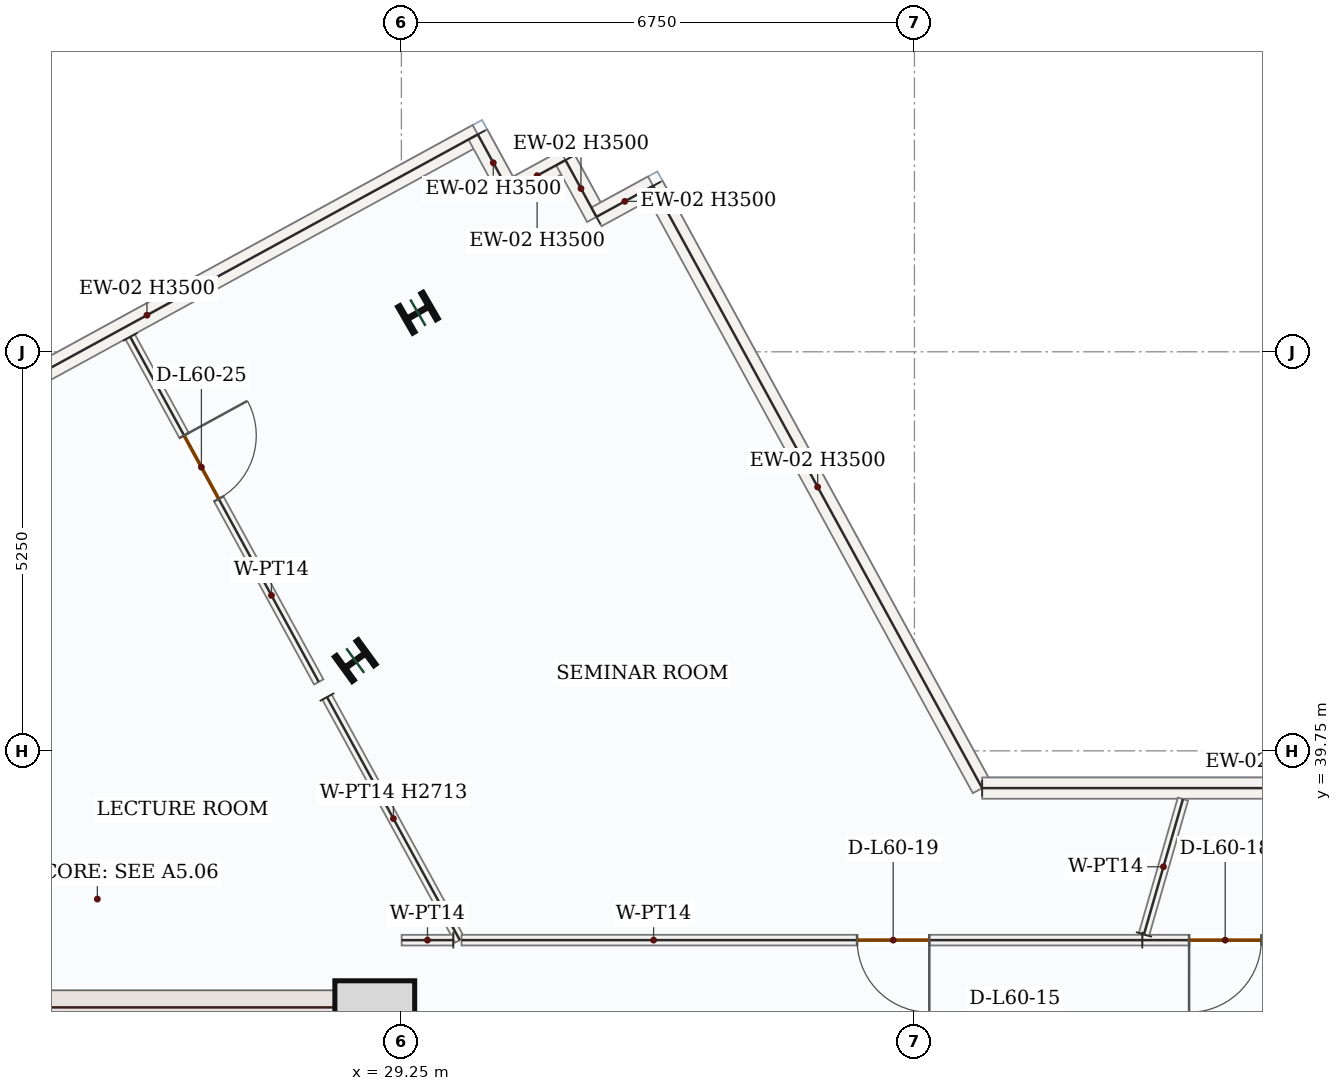
"""IFC4 building model, lengths in metres.
Left out: names, types, materials, properties, quantities, classifications, styles, units other than length and angle.
Written with IfcOpenShell. Run it as: python <this file> out.ifc"""

import sys

from ifc_helpers import new_model, si_unit, direction, frame, frame_2d, origin, origin_2d, place, context, subcontext, project, spatial, rectangle, i_section, extrude, source, transform, mapped, element, fill, save


model = new_model("IFC4")
c1 = context("Model", 3, precision=1e-05, world=origin(), true_north=direction((0.0, 1.0)))
c2 = subcontext(c1, "Body", "Model", "MODEL_VIEW")
j1 = project(units=[si_unit("LENGTHUNIT", "METRE"), si_unit("PLANEANGLEUNIT", "RADIAN")], contexts=[c1])
p1 = place(None, origin())
s1 = spatial("IfcSite", under=j1, at=p1, CompositionType="ELEMENT")
p2 = place(p1, origin())
s2 = spatial("IfcBuilding", under=s1, at=p2, CompositionType="ELEMENT")
p3 = place(p2, frame((0.0, 0.0, 254.1)))
s3 = spatial("IfcBuildingStorey", under=s2, at=p3, CompositionType="ELEMENT", Elevation=254.1)
p4 = place(p3, frame((29.025, 28.05, 0.0), z_axis=(0.0, 0.0, 1.0), x_axis=(0.0, 1.0, 0.0)))
e1 = element("IfcWall", 1, at=p4, inside=s3, PredefinedType="SHEAR", context=c2, shape_type="SweptSolid", body=[
    extrude(rectangle(XDim=8.55, YDim=0.45, at=frame_2d((4.275, 0.0))), origin(), (0.0, 0.0, 1.0), 3.5),
])
p5 = place(p4, frame((1.5, 0.0, 0.0)))
e2 = element("IfcOpeningElement", 2, at=p5, cuts=e1, PredefinedType="OPENING", context=c2, shape_type="SweptSolid", body=[
    extrude(rectangle(XDim=1.1, YDim=2.2, at=frame_2d((0.55, 1.1))), frame((0.0, 0.235, 0.0), z_axis=(0.0, -1.0, 0.0), x_axis=(1.0, 0.0, 0.0)), (0.0, 0.0, 1.0), 0.47),
])
m1 = source(origin(), c2, "Body", "SweptSolid", [
    extrude(rectangle(XDim=7.1, YDim=0.45, at=frame_2d((3.55, 0.0))), origin(), (0.0, 0.0, 1.0), 3.5),
])
p6 = place(p3, frame((21.7, 36.375, 0.0), z_axis=(0.0, 0.0, 1.0), x_axis=(1.0, 0.0, 0.0)))
e3 = element("IfcWall", 3, at=p6, inside=s3, PredefinedType="SHEAR", context=c2, shape_type="MappedRepresentation", body=[
    mapped(m1, transform((0.0, 0.0, 0.0), x_axis=(1.0, 0.0, 0.0), y_axis=(0.0, 1.0, 0.0), z_axis=(0.0, 0.0, 1.0), scale=1.0)),
])
m2 = source(origin(), c2, "Body", "SweptSolid", [
    extrude(rectangle(XDim=1.05, YDim=1.05, at=origin_2d()), origin(), (0.0, 0.0, 1.0), 3.75),
])
p7 = place(p3, frame((28.9, 36.2, 0.0), z_axis=(0.0, 0.0, 1.0), x_axis=(1.0, 0.0, 0.0)))
e4 = element("IfcColumn", 4, at=p7, inside=s3, PredefinedType="COLUMN", context=c2, shape_type="MappedRepresentation", body=[
    mapped(m2, transform((0.0, 0.0, 0.0), x_axis=(1.0, 0.0, 0.0), y_axis=(0.0, 1.0, 0.0), z_axis=(0.0, 0.0, 1.0), scale=1.0)),
])
m3 = source(origin(), c2, "Body", "SweptSolid", [
    extrude(i_section(OverallWidth=0.399, OverallDepth=0.386, WebThickness=0.021, FlangeThickness=0.033, FilletRadius=0.018, at=origin_2d()), origin(), (0.0, 0.0, 1.0), 3.75),
])
for number, where, z_axis, x_axis in (
    (5, (28.643, 40.937, 0.0), (0.0, 0.0, 1.0), (-0.588, 0.809, 0.0)),
    (6, (29.468, 45.514, 0.0), (0.0, 0.0, 1.0), (-0.5, 0.866, 0.0)),
):
    element("IfcColumn", number, at=place(p3, frame(where, z_axis=z_axis, x_axis=x_axis)), inside=s3, PredefinedType="COLUMN", context=c2, shape_type="MappedRepresentation", body=[
        mapped(m3, transform((0.0, 0.0, 0.0), x_axis=(1.0, 0.0, 0.0), y_axis=(0.0, 1.0, 0.0), z_axis=(0.0, 0.0, 1.0), scale=1.0)),
    ])
m4 = source(origin(), c2, "Body", "SweptSolid", [
    extrude(rectangle(XDim=9.92, YDim=0.28, at=frame_2d((4.96, 0.0))), origin(), (0.0, 0.0, 1.0), 3.5),
])
p8 = place(p3, frame((21.55, 43.104, 0.0), z_axis=(0.0, 0.0, 1.0), x_axis=(0.877572768104, 0.479443465574, 0.0)))
e7 = element("IfcWall", 7, at=p8, inside=s3, PredefinedType="SOLIDWALL", context=c2, shape_type="MappedRepresentation", body=[
    mapped(m4, transform((0.0, 0.0, 0.0), x_axis=(1.0, 0.0, 0.0), y_axis=(0.0, 1.0, 0.0), z_axis=(0.0, 0.0, 1.0), scale=1.0)),
])
m5 = source(origin(), c2, "Body", "SweptSolid", [
    extrude(rectangle(XDim=0.85, YDim=0.28, at=frame_2d((0.425, 0.0))), origin(), (0.0, 0.0, 1.0), 3.5),
])
for number, where, z_axis, x_axis in (
    (8, (30.255, 47.86, 0.0), (0.0, 0.0, 1.0), (0.479, -0.878, 0.0)),
    (9, (30.663, 47.114, 0.0), (0.0, 0.0, 1.0), (0.878, 0.479, 0.0)),
):
    element("IfcWall", number, at=place(p3, frame(where, z_axis=z_axis, x_axis=x_axis)), inside=s3, PredefinedType="SOLIDWALL", context=c2, shape_type="MappedRepresentation", body=[
        mapped(m5, transform((0.0, 0.0, 0.0), x_axis=(1.0, 0.0, 0.0), y_axis=(0.0, 1.0, 0.0), z_axis=(0.0, 0.0, 1.0), scale=1.0)),
    ])
m6 = source(origin(), c2, "Body", "SweptSolid", [
    extrude(rectangle(XDim=0.85, YDim=0.28, at=frame_2d((0.425, 0.0))), origin(), (0.0, 0.0, 1.0), 3.5),
])
p9 = place(p3, frame((31.409, 47.521, 0.0), z_axis=(0.0, 0.0, 1.0), x_axis=(0.479656876283, -0.877456141943, 0.0)))
e10 = element("IfcWall", 10, at=p9, inside=s3, PredefinedType="SOLIDWALL", context=c2, shape_type="MappedRepresentation", body=[
    mapped(m6, transform((0.0, 0.0, 0.0), x_axis=(1.0, 0.0, 0.0), y_axis=(0.0, 1.0, 0.0), z_axis=(0.0, 0.0, 1.0), scale=1.0)),
])
p10 = place(p3, frame((31.816, 46.775, 0.0), z_axis=(0.0, 0.0, 1.0), x_axis=(0.877577015132, 0.479435691737, 0.0)))
e11 = element("IfcWall", 11, at=p10, inside=s3, PredefinedType="SOLIDWALL", context=c2, shape_type="MappedRepresentation", body=[
    mapped(m5, transform((0.0, 0.0, 0.0), x_axis=(1.0, 0.0, 0.0), y_axis=(0.0, 1.0, 0.0), z_axis=(0.0, 0.0, 1.0), scale=1.0)),
])
m7 = source(origin(), c2, "Body", "SweptSolid", [
    extrude(rectangle(XDim=9.028, YDim=0.28, at=frame_2d((4.514, 0.0))), origin(), (0.0, 0.0, 1.0), 3.5),
])
p11 = place(p3, frame((32.562, 47.183, 0.0), z_axis=(0.0, 0.0, 1.0), x_axis=(0.479475345647, -0.877555350344, 0.0)))
e12 = element("IfcWall", 12, at=p11, inside=s3, PredefinedType="SOLIDWALL", context=c2, shape_type="MappedRepresentation", body=[
    mapped(m7, transform((0.0, 0.0, 0.0), x_axis=(1.0, 0.0, 0.0), y_axis=(0.0, 1.0, 0.0), z_axis=(0.0, 0.0, 1.0), scale=1.0)),
])
m8 = source(origin(), c2, "Body", "SweptSolid", [
    extrude(rectangle(XDim=7.658, YDim=0.28, at=frame_2d((3.829, 0.0))), origin(), (0.0, 0.0, 1.0), 2.772),
])
p12 = place(p3, frame((36.891, 39.26, 0.0), z_axis=(0.0, 0.0, 1.0), x_axis=(1.0, 0.0, 0.0)))
e13 = element("IfcWall", 13, at=p12, inside=s3, PredefinedType="SOLIDWALL", context=c2, shape_type="MappedRepresentation", body=[
    mapped(m8, transform((0.0, 0.0, 0.0), x_axis=(1.0, 0.0, 0.0), y_axis=(0.0, 1.0, 0.0), z_axis=(0.0, 0.0, 1.0), scale=1.0)),
])
p13 = place(p3, frame((42.747, 37.259, 0.0), z_axis=(0.0, 0.0, 1.0), x_axis=(-0.99999994699, 0.000325605609, 0.0)))
e14 = element("IfcWall", 14, at=p13, inside=s3, PredefinedType="PARTITIONING", context=c2, shape_type="SweptSolid", body=[
    extrude(rectangle(XDim=3.749, YDim=0.14, at=frame_2d((1.875, 0.0))), origin(), (0.0, 0.0, 1.0), 3.5),
])
p14 = place(p13, frame((2.183, 0.0, 0.0)))
e15 = element("IfcOpeningElement", 15, at=p14, cuts=e14, PredefinedType="OPENING", context=c2, shape_type="SweptSolid", body=[
    extrude(rectangle(XDim=0.95, YDim=2.15, at=frame_2d((0.475, 1.075))), frame((0.0, 0.08, 0.0), z_axis=(0.0, -1.0, 0.0), x_axis=(1.0, 0.0, 0.0)), (0.0, 0.0, 1.0), 0.16),
])
m9 = source(origin(), c2, "Body", "SweptSolid", [
    extrude(rectangle(XDim=1.853, YDim=0.14, at=frame_2d((0.926, 0.0))), origin(), (0.0, 0.0, 1.0), 3.5),
])
p15 = place(p3, frame((39.019, 37.335, 0.0), z_axis=(0.0, 0.0, 1.0), x_axis=(0.276896245691, 0.960899822626, 0.0)))
e16 = element("IfcWall", 16, at=p15, inside=s3, PredefinedType="PARTITIONING", context=c2, shape_type="MappedRepresentation", body=[
    mapped(m9, transform((0.0, 0.0, 0.0), x_axis=(1.0, 0.0, 0.0), y_axis=(0.0, 1.0, 0.0), z_axis=(0.0, 0.0, 1.0), scale=1.0)),
])
p16 = place(p3, frame((25.683, 45.196, 0.0), z_axis=(0.0, 0.0, 1.0), x_axis=(0.479427410708, -0.877581539153, 0.0)))
e17 = element("IfcWall", 17, at=p16, inside=s3, PredefinedType="PARTITIONING", context=c2, shape_type="SweptSolid", body=[
    extrude(rectangle(XDim=5.173, YDim=0.14, at=frame_2d((2.586, 0.0))), origin(), (0.0, 0.0, 1.0), 3.5),
])
p17 = place(p16, frame((1.478, 0.0, 0.0)))
e18 = element("IfcOpeningElement", 18, at=p17, cuts=e17, PredefinedType="OPENING", context=c2, shape_type="SweptSolid", body=[
    extrude(rectangle(XDim=0.95, YDim=2.15, at=frame_2d((0.475, 1.075))), frame((0.0, 0.08, 0.0), z_axis=(0.0, -1.0, 0.0), x_axis=(1.0, 0.0, 0.0)), (0.0, 0.0, 1.0), 0.16),
])
m10 = source(origin(), c2, "Body", "SweptSolid", [
    extrude(rectangle(XDim=3.644, YDim=0.14, at=frame_2d((1.822, 0.0))), origin(), (0.0, 0.0, 1.0), 2.713),
])
p18 = place(p3, frame((28.271, 40.457, 0.0), z_axis=(0.0, 0.0, 1.0), x_axis=(0.479509272429, -0.877536812706, 0.0)))
e19 = element("IfcWall", 19, at=p18, inside=s3, PredefinedType="PARTITIONING", context=c2, shape_type="MappedRepresentation", body=[
    mapped(m10, transform((0.0, 0.0, 0.0), x_axis=(1.0, 0.0, 0.0), y_axis=(0.0, 1.0, 0.0), z_axis=(0.0, 0.0, 1.0), scale=1.0)),
])
m11 = source(origin(), c2, "Body", "SweptSolid", [
    extrude(rectangle(XDim=0.68, YDim=0.14, at=frame_2d((0.34, 0.0))), origin(), (0.0, 0.0, 1.0), 3.5),
])
p19 = place(p3, frame((29.933, 37.26, 0.0), z_axis=(0.0, 0.0, 1.0), x_axis=(-0.999999741957, -0.000718390619, 0.0)))
e20 = element("IfcWall", 20, at=p19, inside=s3, PredefinedType="PARTITIONING", context=c2, shape_type="MappedRepresentation", body=[
    mapped(m11, transform((0.0, 0.0, 0.0), x_axis=(1.0, 0.0, 0.0), y_axis=(0.0, 1.0, 0.0), z_axis=(0.0, 0.0, 1.0), scale=1.0)),
])
p20 = place(p3, frame((38.998, 37.26, 0.0), z_axis=(0.0, 0.0, 1.0), x_axis=(-1.0, 0.0, 0.0)))
e21 = element("IfcWall", 21, at=p20, inside=s3, PredefinedType="PARTITIONING", context=c2, shape_type="SweptSolid", body=[
    extrude(rectangle(XDim=8.956, YDim=0.14, at=frame_2d((4.478, 0.0))), origin(), (0.0, 0.0, 1.0), 3.5),
])
p21 = place(p20, frame((2.802, 0.0, 0.0)))
e22 = element("IfcOpeningElement", 22, at=p21, cuts=e21, PredefinedType="OPENING", context=c2, shape_type="SweptSolid", body=[
    extrude(rectangle(XDim=0.95, YDim=2.15, at=frame_2d((0.475, 1.075))), frame((0.0, 0.08, 0.0), z_axis=(0.0, -1.0, 0.0), x_axis=(1.0, 0.0, 0.0)), (0.0, 0.0, 1.0), 0.16),
])
m12 = source(origin(), c2, "Body", "SweptSolid", [
    extrude(rectangle(XDim=0.95, YDim=2.15, at=frame_2d((0.475, 1.075))), frame((0.0, 0.025, 0.0), z_axis=(0.0, -1.0, 0.0), x_axis=(1.0, 0.0, 0.0)), (0.0, 0.0, 1.0), 0.05),
])
p22 = place(p14, origin())
e23 = element("IfcDoor", 23, at=p22, inside=s3, OperationType="SINGLE_SWING_RIGHT", PredefinedType="DOOR", context=c2, shape_type="MappedRepresentation", body=[
    mapped(m12, transform((0.0, 0.0, 0.0), x_axis=(1.0, 0.0, 0.0), y_axis=(0.0, 1.0, 0.0), z_axis=(0.0, 0.0, 1.0), scale=1.0)),
])
fill(e15, e23)
p23 = place(p21, origin())
e24 = element("IfcDoor", 24, at=p23, inside=s3, OperationType="SINGLE_SWING_LEFT", PredefinedType="DOOR", context=c2, shape_type="MappedRepresentation", body=[
    mapped(m12, transform((0.0, 0.0, 0.0), x_axis=(1.0, 0.0, 0.0), y_axis=(0.0, 1.0, 0.0), z_axis=(0.0, 0.0, 1.0), scale=1.0)),
])
fill(e22, e24)
p24 = place(p17, origin())
e25 = element("IfcDoor", 25, at=p24, inside=s3, OperationType="SINGLE_SWING_LEFT", PredefinedType="DOOR", context=c2, shape_type="MappedRepresentation", body=[
    mapped(m12, transform((0.0, 0.0, 0.0), x_axis=(1.0, 0.0, 0.0), y_axis=(0.0, 1.0, 0.0), z_axis=(0.0, 0.0, 1.0), scale=1.0)),
])
fill(e18, e25)
save(model, sys.argv[1])
